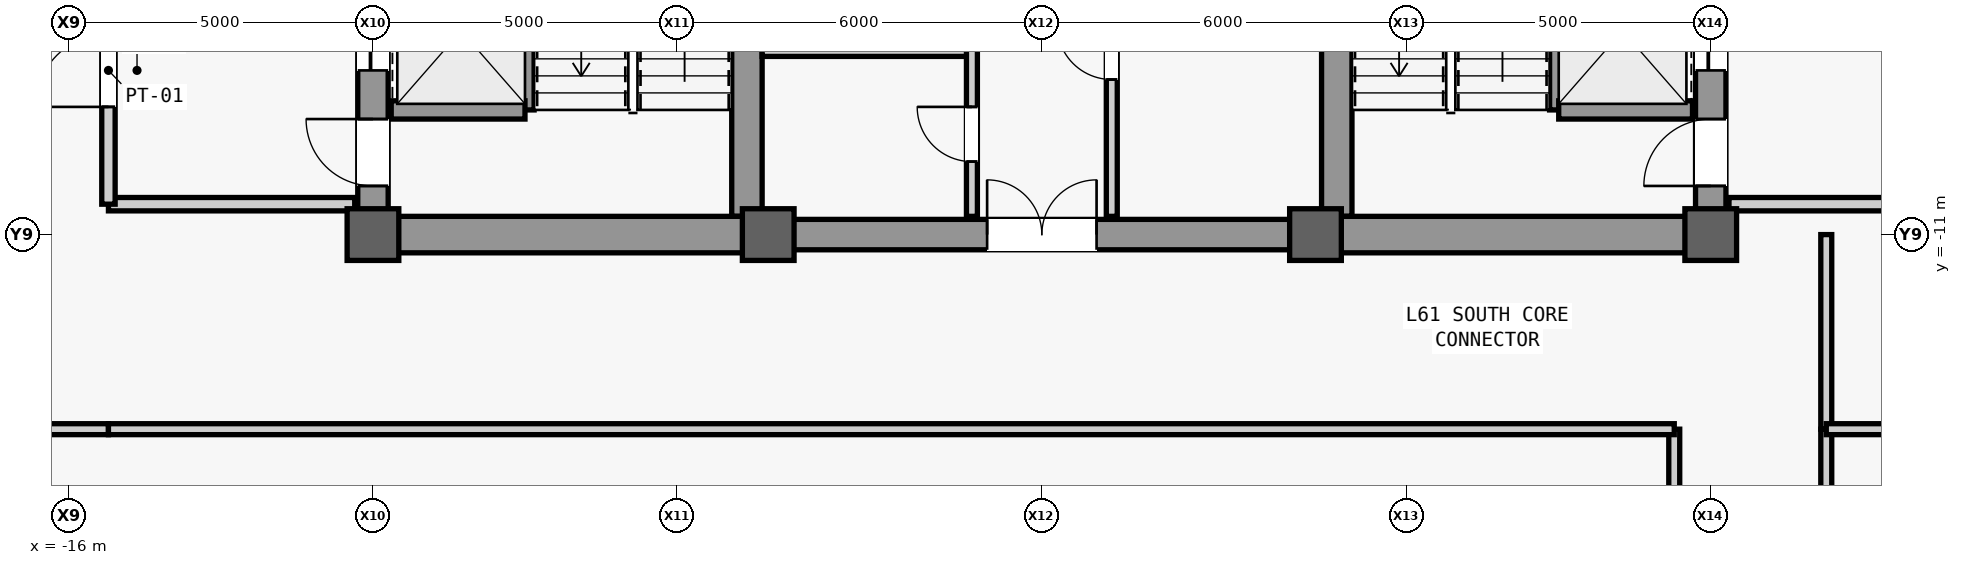
"""IFC4 building model, lengths in metres.
Left out: names, types, materials, properties, quantities, classifications, styles, units other than length and angle.
Written with IfcOpenShell. Run it as: python <this file> out.ifc"""

import sys

from ifc_helpers import new_model, si_unit, direction, frame, frame_2d, origin, origin_2d, place, context, subcontext, project, spatial, rectangle, extrude, source, transform, mapped, element, fill, save


model = new_model("IFC4")
c1 = context("Model", 3, precision=1e-05, world=origin(), true_north=direction((0.0, 1.0)))
c2 = subcontext(c1, "Body", "Model", "MODEL_VIEW")
j1 = project(units=[si_unit("LENGTHUNIT", "METRE"), si_unit("PLANEANGLEUNIT", "RADIAN")], contexts=[c1])
p1 = place(None, origin())
s1 = spatial("IfcSite", under=j1, at=p1, CompositionType="ELEMENT")
p2 = place(p1, origin())
s2 = spatial("IfcBuilding", under=s1, at=p2, CompositionType="ELEMENT")
p3 = place(p2, frame((0.0, 0.0, 259.1)))
s3 = spatial("IfcBuildingStorey", under=s2, at=p3, CompositionType="ELEMENT", Elevation=259.1)
m1 = source(origin(), c2, "Body", "SweptSolid", [
    extrude(rectangle(XDim=22.0, YDim=0.5, at=frame_2d((11.0, 0.0))), origin(), (0.0, 0.0, 1.0), 3.78),
])
p4 = place(p3, frame((-11.0, -11.0, 0.0), z_axis=(0.0, 0.0, 1.0), x_axis=(0.0, 1.0, 0.0)))
e1 = element("IfcWall", 1, at=p4, inside=s3, PredefinedType="SHEAR", context=c2, shape_type="MappedRepresentation", body=[
    mapped(m1, transform((0.0, 0.0, 0.0), scale=1.0)),
])
m2 = source(origin(), c2, "Body", "SweptSolid", [
    extrude(rectangle(XDim=1.1, YDim=2.2, at=frame_2d((0.55, 1.1))), frame((0.0, 0.26, 0.0), z_axis=(0.0, -1.0, 0.0), x_axis=(1.0, 0.0, 0.0)), (0.0, 0.0, 1.0), 0.52),
])
p5 = place(p4, frame((0.8, 0.0, 0.0)))
e2 = element("IfcOpeningElement", 2, at=p5, cuts=e1, PredefinedType="OPENING", context=c2, shape_type="MappedRepresentation", body=[
    mapped(m2, transform((0.0, 0.0, 0.0), scale=1.0)),
])
p6 = place(p4, frame((12.5, 0.0, 0.0)))
e3 = element("IfcOpeningElement", 3, at=p6, cuts=e1, PredefinedType="OPENING", context=c2, shape_type="MappedRepresentation", body=[
    mapped(m2, transform((0.0, 0.0, 0.0), scale=1.0)),
])
m3 = source(origin(), c2, "Body", "SweptSolid", [
    extrude(rectangle(XDim=0.9, YDim=2.15, at=frame_2d((0.45, 1.075))), frame((0.0, 0.26, 0.0), z_axis=(0.0, -1.0, 0.0), x_axis=(1.0, 0.0, 0.0)), (0.0, 0.0, 1.0), 0.52),
])
p7 = place(p4, frame((6.85, 0.0, 0.0)))
e4 = element("IfcOpeningElement", 4, at=p7, cuts=e1, PredefinedType="OPENING", context=c2, shape_type="MappedRepresentation", body=[
    mapped(m3, transform((0.0, 0.0, 0.0), scale=1.0)),
])
m4 = source(origin(), c2, "Body", "SweptSolid", [
    extrude(rectangle(XDim=1.3, YDim=2.3, at=frame_2d((0.65, 1.15))), frame((0.0, 0.26, 0.0), z_axis=(0.0, -1.0, 0.0), x_axis=(1.0, 0.0, 0.0)), (0.0, 0.0, 1.0), 0.52),
])
p8 = place(p4, frame((2.7, 0.0, 0.0)))
e5 = element("IfcOpeningElement", 5, at=p8, cuts=e1, PredefinedType="OPENING", context=c2, shape_type="MappedRepresentation", body=[
    mapped(m4, transform((0.0, 0.0, 0.0), scale=1.0)),
])
p9 = place(p3, frame((11.0, -11.0, 0.0), z_axis=(0.0, 0.0, 1.0), x_axis=(0.0, 1.0, 0.0)))
e6 = element("IfcWall", 6, at=p9, inside=s3, PredefinedType="SHEAR", context=c2, shape_type="MappedRepresentation", body=[
    mapped(m1, transform((0.0, 0.0, 0.0), scale=1.0)),
])
p10 = place(p9, frame((0.8, 0.0, 0.0)))
e7 = element("IfcOpeningElement", 7, at=p10, cuts=e6, PredefinedType="OPENING", context=c2, shape_type="MappedRepresentation", body=[
    mapped(m2, transform((0.0, 0.0, 0.0), scale=1.0)),
])
p11 = place(p9, frame((6.2, 0.0, 0.0)))
e8 = element("IfcOpeningElement", 8, at=p11, cuts=e6, PredefinedType="OPENING", context=c2, shape_type="MappedRepresentation", body=[
    mapped(m3, transform((0.0, 0.0, 0.0), scale=1.0)),
])
p12 = place(p9, frame((8.05, 0.0, 0.0)))
e9 = element("IfcOpeningElement", 9, at=p12, cuts=e6, PredefinedType="OPENING", context=c2, shape_type="MappedRepresentation", body=[
    mapped(m3, transform((0.0, 0.0, 0.0), scale=1.0)),
])
p13 = place(p9, frame((2.7, 0.0, 0.0)))
e10 = element("IfcOpeningElement", 10, at=p13, cuts=e6, PredefinedType="OPENING", context=c2, shape_type="MappedRepresentation", body=[
    mapped(m4, transform((0.0, 0.0, 0.0), scale=1.0)),
])
p14 = place(p9, frame((13.35, 0.0, 0.0)))
e11 = element("IfcOpeningElement", 11, at=p14, cuts=e6, PredefinedType="OPENING", context=c2, shape_type="MappedRepresentation", body=[
    mapped(m4, transform((0.0, 0.0, 0.0), scale=1.0)),
])
m5 = source(origin(), c2, "Body", "SweptSolid", [
    extrude(rectangle(XDim=21.4, YDim=0.5, at=frame_2d((10.7, 0.0))), origin(), (0.0, 0.0, 1.0), 3.78),
])
for number, where, z_axis, x_axis in (
    (12, (-4.85, -10.7, 0.0), (0.0, 0.0, 1.0), (0.0, 1.0, 0.0)),
    (13, (4.85, -10.7, 0.0), (0.0, 0.0, 1.0), (0.0, 1.0, 0.0)),
):
    element("IfcWall", number, at=place(p3, frame(where, z_axis=z_axis, x_axis=x_axis)), inside=s3, PredefinedType="SHEAR", context=c2, shape_type="MappedRepresentation", body=[
        mapped(m5, transform((0.0, 0.0, 0.0), scale=1.0)),
    ])
m6 = source(origin(), c2, "Body", "SweptSolid", [
    extrude(rectangle(XDim=5.9, YDim=0.6, at=frame_2d((2.95, 0.0))), origin(), (0.0, 0.0, 1.0), 3.78),
])
for number, where, z_axis, x_axis in (
    (14, (-10.75, -11.0, 0.0), (0.0, 0.0, 1.0), (1.0, 0.0, 0.0)),
    (15, (4.85, -11.0, 0.0), (0.0, 0.0, 1.0), (1.0, 0.0, 0.0)),
):
    element("IfcWall", number, at=place(p3, frame(where, z_axis=z_axis, x_axis=x_axis)), inside=s3, PredefinedType="SHEAR", context=c2, shape_type="MappedRepresentation", body=[
        mapped(m6, transform((0.0, 0.0, 0.0), scale=1.0)),
    ])
m7 = source(origin(), c2, "Body", "SweptSolid", [
    extrude(rectangle(XDim=9.2, YDim=0.5, at=frame_2d((4.6, 0.0))), origin(), (0.0, 0.0, 1.0), 3.78),
])
p15 = place(p3, frame((-4.6, -11.0, 0.0), z_axis=(0.0, 0.0, 1.0), x_axis=(1.0, 0.0, 0.0)))
e16 = element("IfcWall", 16, at=p15, inside=s3, PredefinedType="SHEAR", context=c2, shape_type="MappedRepresentation", body=[
    mapped(m7, transform((0.0, 0.0, 0.0), scale=1.0)),
])
m8 = source(origin(), c2, "Body", "SweptSolid", [
    extrude(rectangle(XDim=1.8, YDim=2.25, at=frame_2d((0.9, 1.125))), frame((0.0, 0.26, 0.0), z_axis=(0.0, -1.0, 0.0), x_axis=(1.0, 0.0, 0.0)), (0.0, 0.0, 1.0), 0.52),
])
p16 = place(p15, frame((3.7, 0.0, 0.0)))
e17 = element("IfcOpeningElement", 17, at=p16, cuts=e16, PredefinedType="OPENING", context=c2, shape_type="MappedRepresentation", body=[
    mapped(m8, transform((0.0, 0.0, 0.0), scale=1.0)),
])
m9 = source(origin(), c2, "Body", "SweptSolid", [
    extrude(rectangle(XDim=0.85, YDim=0.85, at=origin_2d()), origin(), (0.0, 0.0, 1.0), 4.0),
])
for number, where, z_axis, x_axis in (
    (18, (-11.0, -11.0, 0.0), (0.0, 0.0, 1.0), (1.0, 0.0, 0.0)),
    (19, (-4.5, -11.0, 0.0), (0.0, 0.0, 1.0), (1.0, 0.0, 0.0)),
    (20, (4.5, -11.0, 0.0), (0.0, 0.0, 1.0), (1.0, 0.0, 0.0)),
    (21, (11.0, -11.0, 0.0), (0.0, 0.0, 1.0), (1.0, 0.0, 0.0)),
):
    element("IfcColumn", number, at=place(p3, frame(where, z_axis=z_axis, x_axis=x_axis)), inside=s3, PredefinedType="COLUMN", context=c2, shape_type="MappedRepresentation", body=[
        mapped(m9, transform((0.0, 0.0, 0.0), scale=1.0)),
    ])
m10 = source(origin(), c2, "Body", "SweptSolid", [
    extrude(rectangle(XDim=7.8, YDim=0.3, at=frame_2d((3.9, 0.0))), origin(), (0.0, 0.0, 1.0), 3.78),
])
p17 = place(p3, frame((-8.5, -8.95, 0.0), z_axis=(0.0, 0.0, 1.0), x_axis=(0.0, 1.0, 0.0)))
e22 = element("IfcWall", 22, at=p17, inside=s3, PredefinedType="SHEAR", context=c2, shape_type="MappedRepresentation", body=[
    mapped(m10, transform((0.0, 0.0, 0.0), scale=1.0)),
])
m11 = source(origin(), c2, "Body", "SweptSolid", [
    extrude(rectangle(XDim=2.2, YDim=0.3, at=frame_2d((1.1, 0.0))), origin(), (0.0, 0.0, 1.0), 3.78),
])
p18 = place(p3, frame((-10.7, -8.95, 0.0), z_axis=(0.0, 0.0, 1.0), x_axis=(1.0, 0.0, 0.0)))
e23 = element("IfcWall", 23, at=p18, inside=s3, PredefinedType="SHEAR", context=c2, shape_type="MappedRepresentation", body=[
    mapped(m11, transform((0.0, 0.0, 0.0), scale=1.0)),
])
p19 = place(p3, frame((8.5, -8.95, 0.0), z_axis=(0.0, 0.0, 1.0), x_axis=(0.0, 1.0, 0.0)))
e24 = element("IfcWall", 24, at=p19, inside=s3, PredefinedType="SHEAR", context=c2, shape_type="MappedRepresentation", body=[
    mapped(m10, transform((0.0, 0.0, 0.0), scale=1.0)),
])
p20 = place(p3, frame((8.5, -8.95, 0.0), z_axis=(0.0, 0.0, 1.0), x_axis=(1.0, 0.0, 0.0)))
e25 = element("IfcWall", 25, at=p20, inside=s3, PredefinedType="SHEAR", context=c2, shape_type="MappedRepresentation", body=[
    mapped(m11, transform((0.0, 0.0, 0.0), scale=1.0)),
])
m12 = source(origin(), c2, "Body", "SweptSolid", [
    extrude(rectangle(XDim=4.05, YDim=0.22, at=frame_2d((2.025, 0.0))), origin(), (0.0, 0.0, 1.0), 3.78),
])
p21 = place(p3, frame((-15.35, -10.5, 0.0), z_axis=(0.0, 0.0, 1.0), x_axis=(1.0, 0.0, 0.0)))
e26 = element("IfcWall", 26, at=p21, inside=s3, PredefinedType="PARTITIONING", context=c2, shape_type="MappedRepresentation", body=[
    mapped(m12, transform((0.0, 0.0, 0.0), scale=1.0)),
])
m13 = source(origin(), c2, "Body", "SweptSolid", [
    extrude(rectangle(XDim=4.4, YDim=0.22, at=frame_2d((2.2, 0.0))), origin(), (0.0, 0.0, 1.0), 3.78),
])
p22 = place(p3, frame((-15.35, -10.5, 0.0), z_axis=(0.0, 0.0, 1.0), x_axis=(0.0, 1.0, 0.0)))
e27 = element("IfcWall", 27, at=p22, inside=s3, PredefinedType="PARTITIONING", context=c2, shape_type="MappedRepresentation", body=[
    mapped(m13, transform((0.0, 0.0, 0.0), scale=1.0)),
])
m14 = source(origin(), c2, "Body", "SweptSolid", [
    extrude(rectangle(XDim=1.2, YDim=2.2, at=frame_2d((0.6, 1.1))), frame((0.0, 0.12, 0.0), z_axis=(0.0, -1.0, 0.0), x_axis=(1.0, 0.0, 0.0)), (0.0, 0.0, 1.0), 0.24),
])
p23 = place(p22, frame((1.6, 0.0, 0.0)))
e28 = element("IfcOpeningElement", 28, at=p23, cuts=e27, PredefinedType="OPENING", context=c2, shape_type="MappedRepresentation", body=[
    mapped(m14, transform((0.0, 0.0, 0.0), scale=1.0)),
])
p24 = place(p3, frame((11.3, -10.5, 0.0), z_axis=(0.0, 0.0, 1.0), x_axis=(1.0, 0.0, 0.0)))
e29 = element("IfcWall", 29, at=p24, inside=s3, PredefinedType="PARTITIONING", context=c2, shape_type="MappedRepresentation", body=[
    mapped(m12, transform((0.0, 0.0, 0.0), scale=1.0)),
])
m15 = source(origin(), c2, "Body", "SweptSolid", [
    extrude(rectangle(XDim=3.45, YDim=0.14, at=frame_2d((1.725, 0.0))), origin(), (0.0, 0.0, 1.0), 3.78),
])
p25 = place(p3, frame((-4.6, -8.0, 0.0), z_axis=(0.0, 0.0, 1.0), x_axis=(1.0, 0.0, 0.0)))
e30 = element("IfcWall", 30, at=p25, inside=s3, PredefinedType="PARTITIONING", context=c2, shape_type="MappedRepresentation", body=[
    mapped(m15, transform((0.0, 0.0, 0.0), scale=1.0)),
])
m16 = source(origin(), c2, "Body", "SweptSolid", [
    extrude(rectangle(XDim=5.4, YDim=0.18, at=frame_2d((2.7, 0.0))), origin(), (0.0, 0.0, 1.0), 3.78),
])
p26 = place(p3, frame((-1.15, -10.7, 0.0), z_axis=(0.0, 0.0, 1.0), x_axis=(0.0, 1.0, 0.0)))
e31 = element("IfcWall", 31, at=p26, inside=s3, PredefinedType="PARTITIONING", context=c2, shape_type="MappedRepresentation", body=[
    mapped(m16, transform((0.0, 0.0, 0.0), scale=1.0)),
])
m17 = source(origin(), c2, "Body", "SweptSolid", [
    extrude(rectangle(XDim=0.9, YDim=2.15, at=frame_2d((0.45, 1.075))), frame((0.0, 0.1, 0.0), z_axis=(0.0, -1.0, 0.0), x_axis=(1.0, 0.0, 0.0)), (0.0, 0.0, 1.0), 0.2),
])
p27 = place(p26, frame((0.9, 0.0, 0.0)))
e32 = element("IfcOpeningElement", 32, at=p27, cuts=e31, PredefinedType="OPENING", context=c2, shape_type="MappedRepresentation", body=[
    mapped(m17, transform((0.0, 0.0, 0.0), scale=1.0)),
])
p28 = place(p26, frame((3.6, 0.0, 0.0)))
e33 = element("IfcOpeningElement", 33, at=p28, cuts=e31, PredefinedType="OPENING", context=c2, shape_type="MappedRepresentation", body=[
    mapped(m17, transform((0.0, 0.0, 0.0), scale=1.0)),
])
p29 = place(p3, frame((1.15, -10.7, 0.0), z_axis=(0.0, 0.0, 1.0), x_axis=(0.0, 1.0, 0.0)))
e34 = element("IfcWall", 34, at=p29, inside=s3, PredefinedType="PARTITIONING", context=c2, shape_type="MappedRepresentation", body=[
    mapped(m16, transform((0.0, 0.0, 0.0), scale=1.0)),
])
p30 = place(p29, frame((2.25, 0.0, 0.0)))
e35 = element("IfcOpeningElement", 35, at=p30, cuts=e34, PredefinedType="OPENING", context=c2, shape_type="MappedRepresentation", body=[
    mapped(m17, transform((0.0, 0.0, 0.0), scale=1.0)),
])
m18 = source(origin(), c2, "Body", "SweptSolid", [
    extrude(rectangle(XDim=2.45, YDim=0.18, at=frame_2d((1.225, 0.0))), origin(), (0.0, 0.0, 1.0), 3.78),
])
p31 = place(p3, frame((-17.8, -14.2, 0.0), z_axis=(0.0, 0.0, 1.0), x_axis=(1.0, 0.0, 0.0)))
e36 = element("IfcWall", 36, at=p31, inside=s3, PredefinedType="PARTITIONING", context=c2, shape_type="MappedRepresentation", body=[
    mapped(m18, transform((0.0, 0.0, 0.0), scale=1.0)),
])
m19 = source(origin(), c2, "Body", "SweptSolid", [
    extrude(rectangle(XDim=3.2, YDim=0.18, at=frame_2d((1.6, 0.0))), origin(), (0.0, 0.0, 1.0), 3.78),
])
p32 = place(p3, frame((12.9, -14.2, 0.0), z_axis=(0.0, 0.0, 1.0), x_axis=(0.0, 1.0, 0.0)))
e37 = element("IfcWall", 37, at=p32, inside=s3, PredefinedType="PARTITIONING", context=c2, shape_type="MappedRepresentation", body=[
    mapped(m19, transform((0.0, 0.0, 0.0), scale=1.0)),
])
m20 = source(origin(), c2, "Body", "SweptSolid", [
    extrude(rectangle(XDim=15.8, YDim=0.18, at=frame_2d((7.9, 0.0))), origin(), (0.0, 0.0, 1.0), 3.78),
])
p33 = place(p3, frame((10.4, -30.0, 0.0), z_axis=(0.0, 0.0, 1.0), x_axis=(0.0, 1.0, 0.0)))
e38 = element("IfcWall", 38, at=p33, inside=s3, PredefinedType="PARTITIONING", context=c2, shape_type="MappedRepresentation", body=[
    mapped(m20, transform((0.0, 0.0, 0.0), scale=1.0)),
])
m21 = source(origin(), c2, "Body", "SweptSolid", [
    extrude(rectangle(XDim=1.05, YDim=2.2, at=frame_2d((0.525, 1.1))), frame((0.0, 0.1, 0.0), z_axis=(0.0, -1.0, 0.0), x_axis=(1.0, 0.0, 0.0)), (0.0, 0.0, 1.0), 0.2),
])
p34 = place(p33, frame((3.425, 0.0, 0.0)))
e39 = element("IfcOpeningElement", 39, at=p34, cuts=e38, PredefinedType="OPENING", context=c2, shape_type="MappedRepresentation", body=[
    mapped(m21, transform((0.0, 0.0, 0.0), scale=1.0)),
])
m22 = source(origin(), c2, "Body", "SweptSolid", [
    extrude(rectangle(XDim=25.75, YDim=0.18, at=frame_2d((12.875, 0.0))), origin(), (0.0, 0.0, 1.0), 3.78),
])
p35 = place(p3, frame((-15.35, -14.2, 0.0), z_axis=(0.0, 0.0, 1.0), x_axis=(1.0, 0.0, 0.0)))
e40 = element("IfcWall", 40, at=p35, inside=s3, PredefinedType="PARTITIONING", context=c2, shape_type="MappedRepresentation", body=[
    mapped(m22, transform((0.0, 0.0, 0.0), scale=1.0)),
])
p36 = place(p3, frame((12.9, -30.0, 0.0), z_axis=(0.0, 0.0, 1.0), x_axis=(0.0, 1.0, 0.0)))
e41 = element("IfcWall", 41, at=p36, inside=s3, PredefinedType="PARTITIONING", context=c2, shape_type="MappedRepresentation", body=[
    mapped(m20, transform((0.0, 0.0, 0.0), scale=1.0)),
])
p37 = place(p36, frame((3.425, 0.0, 0.0)))
e42 = element("IfcOpeningElement", 42, at=p37, cuts=e41, PredefinedType="OPENING", context=c2, shape_type="MappedRepresentation", body=[
    mapped(m21, transform((0.0, 0.0, 0.0), scale=1.0)),
])
m23 = source(origin(), c2, "Body", "SweptSolid", [
    extrude(rectangle(XDim=2.45, YDim=0.18, at=frame_2d((1.225, 0.0))), origin(), (0.0, 0.0, 1.0), 3.78),
])
p38 = place(p3, frame((12.9, -14.2, 0.0), z_axis=(0.0, 0.0, 1.0), x_axis=(1.0, 0.0, 0.0)))
e43 = element("IfcWall", 43, at=p38, inside=s3, PredefinedType="PARTITIONING", context=c2, shape_type="MappedRepresentation", body=[
    mapped(m23, transform((0.0, 0.0, 0.0), scale=1.0)),
])
m24 = source(origin(), c2, "Body", "SweptSolid", [
    extrude(rectangle(XDim=1.1, YDim=2.2, at=frame_2d((0.55, 1.1))), frame((0.0, 0.025, 0.0), z_axis=(0.0, -1.0, 0.0), x_axis=(1.0, 0.0, 0.0)), (0.0, 0.0, 1.0), 0.05),
])
p39 = place(p5, origin())
e44 = element("IfcDoor", 44, at=p39, inside=s3, OperationType="SINGLE_SWING_RIGHT", PredefinedType="DOOR", context=c2, shape_type="MappedRepresentation", body=[
    mapped(m24, transform((0.0, 0.0, 0.0), scale=1.0)),
])
fill(e2, e44)
p40 = place(p10, origin())
e45 = element("IfcDoor", 45, at=p40, inside=s3, OperationType="SINGLE_SWING_LEFT", PredefinedType="DOOR", context=c2, shape_type="MappedRepresentation", body=[
    mapped(m24, transform((0.0, 0.0, 0.0), scale=1.0)),
])
fill(e7, e45)
m25 = source(origin(), c2, "Body", "SweptSolid", [
    extrude(rectangle(XDim=1.2, YDim=2.2, at=frame_2d((0.6, 1.1))), frame((0.0, 0.025, 0.0), z_axis=(0.0, -1.0, 0.0), x_axis=(1.0, 0.0, 0.0)), (0.0, 0.0, 1.0), 0.05),
])
p41 = place(p23, origin())
e46 = element("IfcDoor", 46, at=p41, inside=s3, OperationType="SINGLE_SWING_LEFT", PredefinedType="DOOR", context=c2, shape_type="MappedRepresentation", body=[
    mapped(m25, transform((0.0, 0.0, 0.0), scale=1.0)),
])
fill(e28, e46)
m26 = source(origin(), c2, "Body", "SweptSolid", [
    extrude(rectangle(XDim=0.9, YDim=2.15, at=frame_2d((0.45, 1.075))), frame((0.0, 0.025, 0.0), z_axis=(0.0, -1.0, 0.0), x_axis=(1.0, 0.0, 0.0)), (0.0, 0.0, 1.0), 0.05),
])
p42 = place(p27, origin())
e47 = element("IfcDoor", 47, at=p42, inside=s3, OperationType="SINGLE_SWING_RIGHT", PredefinedType="DOOR", context=c2, shape_type="MappedRepresentation", body=[
    mapped(m26, transform((0.0, 0.0, 0.0), scale=1.0)),
])
fill(e32, e47)
p43 = place(p30, origin())
e48 = element("IfcDoor", 48, at=p43, inside=s3, OperationType="SINGLE_SWING_RIGHT", PredefinedType="DOOR", context=c2, shape_type="MappedRepresentation", body=[
    mapped(m26, transform((0.0, 0.0, 0.0), scale=1.0)),
])
fill(e35, e48)
m27 = source(origin(), c2, "Body", "SweptSolid", [
    extrude(rectangle(XDim=1.8, YDim=2.25, at=frame_2d((0.9, 1.125))), frame((0.0, 0.025, 0.0), z_axis=(0.0, -1.0, 0.0), x_axis=(1.0, 0.0, 0.0)), (0.0, 0.0, 1.0), 0.05),
])
p44 = place(p16, origin())
e49 = element("IfcDoor", 49, at=p44, inside=s3, OperationType="SINGLE_SWING_LEFT", PredefinedType="DOOR", context=c2, shape_type="MappedRepresentation", body=[
    mapped(m27, transform((0.0, 0.0, 0.0), scale=1.0)),
])
fill(e17, e49)
m28 = source(origin(), c2, "Body", "SweptSolid", [
    extrude(rectangle(XDim=1.3, YDim=2.3, at=frame_2d((0.65, 1.15))), frame((0.0, 0.025, 0.0), z_axis=(0.0, -1.0, 0.0), x_axis=(1.0, 0.0, 0.0)), (0.0, 0.0, 1.0), 0.05),
])
p45 = place(p8, origin())
e50 = element("IfcDoor", 50, at=p45, inside=s3, OperationType="SLIDING_TO_LEFT", PredefinedType="DOOR", context=c2, shape_type="MappedRepresentation", body=[
    mapped(m28, transform((0.0, 0.0, 0.0), scale=1.0)),
])
fill(e5, e50)
p46 = place(p13, origin())
e51 = element("IfcDoor", 51, at=p46, inside=s3, OperationType="SLIDING_TO_LEFT", PredefinedType="DOOR", context=c2, shape_type="MappedRepresentation", body=[
    mapped(m28, transform((0.0, 0.0, 0.0), scale=1.0)),
])
fill(e10, e51)
save(model, sys.argv[1])
